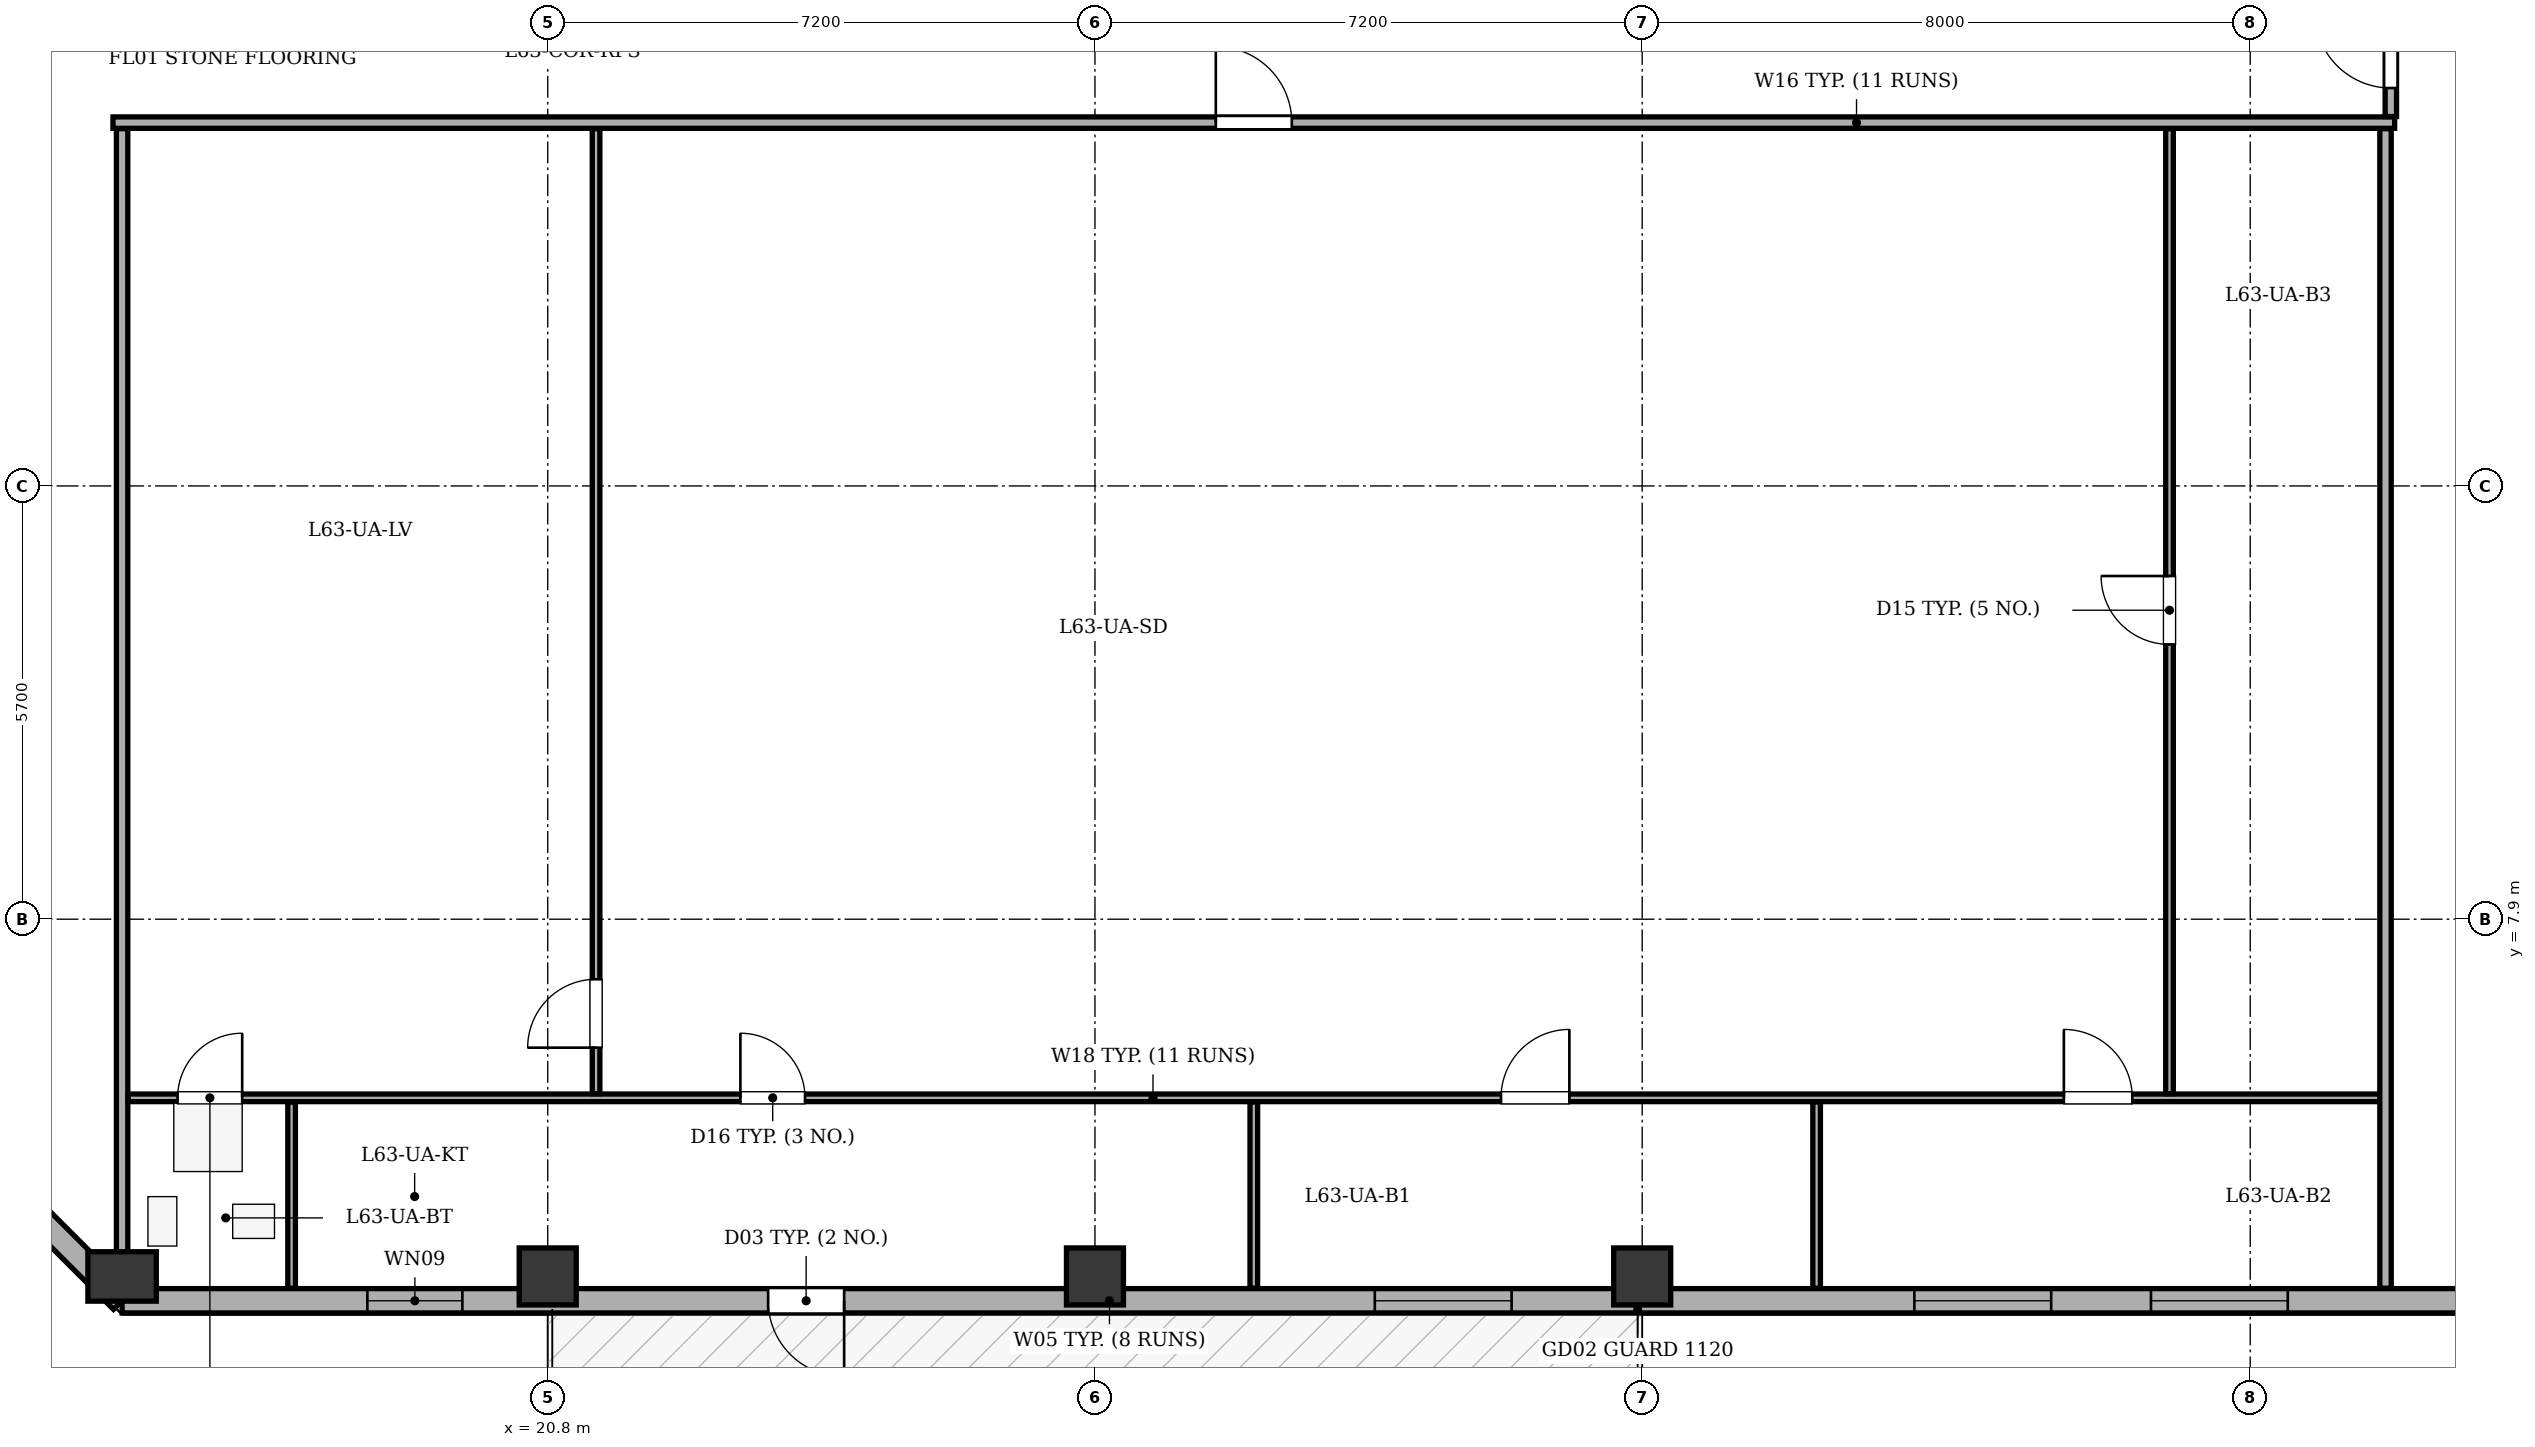
"""IFC4 building model, lengths in metres.
Left out: names, types, materials, properties, quantities, classifications, styles, units other than length and angle.
Written with IfcOpenShell. Run it as: python <this file> out.ifc"""

import sys

from ifc_helpers import new_model, si_unit, direction, frame, frame_2d, origin, origin_2d, place, context, subcontext, project, spatial, rectangle, extrude, element, fill, save


model = new_model("IFC4")
c1 = context("Model", 3, precision=1e-05, world=origin(), true_north=direction((0.0, 1.0)))
c2 = subcontext(c1, "Body", "Model", "MODEL_VIEW")
j1 = project(units=[si_unit("LENGTHUNIT", "METRE"), si_unit("PLANEANGLEUNIT", "RADIAN")], contexts=[c1])
p1 = place(None, origin())
s1 = spatial("IfcSite", under=j1, at=p1, CompositionType="ELEMENT")
p2 = place(p1, origin())
s2 = spatial("IfcBuilding", under=s1, at=p2, CompositionType="ELEMENT")
p3 = place(p2, frame((0.0, 0.0, 241.5)))
s3 = spatial("IfcBuildingStorey", under=s2, at=p3, CompositionType="ELEMENT", Elevation=241.5)
p4 = place(p3, frame((15.2, 3.2, 0.0), z_axis=(0.0, 0.0, 1.0), x_axis=(1.0, 0.0, 0.0)))
e1 = element("IfcColumn", 1, at=p4, inside=s3, PredefinedType="COLUMN", context=c2, shape_type="SweptSolid", body=[
    extrude(rectangle(XDim=0.65, YDim=0.9, at=origin_2d()), origin(), (0.0, 0.0, 1.0), 3.4),
])
for number, where, z_axis, x_axis in (
    (2, (20.8, 3.2, 0.0), (0.0, 0.0, 1.0), (1.0, 0.0, 0.0)),
    (3, (28.0, 3.2, 0.0), (0.0, 0.0, 1.0), (1.0, 0.0, 0.0)),
    (4, (35.2, 3.2, 0.0), (0.0, 0.0, 1.0), (1.0, 0.0, 0.0)),
):
    element("IfcColumn", number, at=place(p3, frame(where, z_axis=z_axis, x_axis=x_axis)), inside=s3, PredefinedType="COLUMN", context=c2, shape_type="SweptSolid", body=[
        extrude(rectangle(XDim=0.75, YDim=0.75, at=origin_2d()), origin(), (0.0, 0.0, 1.0), 3.4),
    ])
p5 = place(p3, frame((51.2, 2.88, 0.0), z_axis=(0.0, 0.0, 1.0), x_axis=(-1.0, 0.0, 0.0)))
e5 = element("IfcWall", 5, at=p5, inside=s3, PredefinedType="STANDARD", context=c2, shape_type="SweptSolid", body=[
    extrude(rectangle(XDim=36.0, YDim=0.32, at=frame_2d((18.0, 0.0))), origin(), (0.0, 0.0, 1.0), 2.725),
])
p6 = place(p5, frame((26.5, 0.0, 0.0)))
e6 = element("IfcOpeningElement", 6, at=p6, cuts=e5, PredefinedType="OPENING", context=c2, shape_type="SweptSolid", body=[
    extrude(rectangle(XDim=1.0, YDim=2.02, at=frame_2d((0.5, 1.01))), frame((0.0, 0.17, 0.0), z_axis=(0.0, -1.0, 0.0), x_axis=(1.0, 0.0, 0.0)), (0.0, 0.0, 1.0), 0.34),
])
p7 = place(p5, frame((2.31, 0.0, 0.75)))
e7 = element("IfcOpeningElement", 7, at=p7, cuts=e5, PredefinedType="OPENING", context=c2, shape_type="SweptSolid", body=[
    extrude(rectangle(XDim=1.8, YDim=1.7, at=frame_2d((0.9, 0.85))), frame((0.0, 0.17, 0.0), z_axis=(0.0, -1.0, 0.0), x_axis=(1.0, 0.0, 0.0)), (0.0, 0.0, 1.0), 0.34),
])
p8 = place(p5, frame((7.506, 0.0, 0.75)))
e8 = element("IfcOpeningElement", 8, at=p8, cuts=e5, PredefinedType="OPENING", context=c2, shape_type="SweptSolid", body=[
    extrude(rectangle(XDim=1.8, YDim=1.7, at=frame_2d((0.9, 0.85))), frame((0.0, 0.17, 0.0), z_axis=(0.0, -1.0, 0.0), x_axis=(1.0, 0.0, 0.0)), (0.0, 0.0, 1.0), 0.34),
])
p9 = place(p5, frame((10.619, 0.0, 0.75)))
e9 = element("IfcOpeningElement", 9, at=p9, cuts=e5, PredefinedType="OPENING", context=c2, shape_type="SweptSolid", body=[
    extrude(rectangle(XDim=1.8, YDim=1.7, at=frame_2d((0.9, 0.85))), frame((0.0, 0.17, 0.0), z_axis=(0.0, -1.0, 0.0), x_axis=(1.0, 0.0, 0.0)), (0.0, 0.0, 1.0), 0.34),
])
p10 = place(p5, frame((17.718, 0.0, 0.75)))
e10 = element("IfcOpeningElement", 10, at=p10, cuts=e5, PredefinedType="OPENING", context=c2, shape_type="SweptSolid", body=[
    extrude(rectangle(XDim=1.8, YDim=1.7, at=frame_2d((0.9, 0.85))), frame((0.0, 0.17, 0.0), z_axis=(0.0, -1.0, 0.0), x_axis=(1.0, 0.0, 0.0)), (0.0, 0.0, 1.0), 0.34),
])
p11 = place(p5, frame((31.523, 0.0, 0.75)))
e11 = element("IfcOpeningElement", 11, at=p11, cuts=e5, PredefinedType="OPENING", context=c2, shape_type="SweptSolid", body=[
    extrude(rectangle(XDim=1.25, YDim=1.7, at=frame_2d((0.625, 0.85))), frame((0.0, 0.17, 0.0), z_axis=(0.0, -1.0, 0.0), x_axis=(1.0, 0.0, 0.0)), (0.0, 0.0, 1.0), 0.34),
])
p12 = place(p3, frame((15.2, 2.88, 0.0), z_axis=(0.0, 0.0, 1.0), x_axis=(-0.707106781187, 0.707106781187, 0.0)))
e12 = element("IfcWall", 12, at=p12, inside=s3, PredefinedType="STANDARD", context=c2, shape_type="SweptSolid", body=[
    extrude(rectangle(XDim=6.11, YDim=0.32, at=frame_2d((3.055, 0.0))), origin(), (0.0, 0.0, 1.0), 2.725),
])
p13 = place(p12, frame((2.355, 0.0, 0.75)))
e13 = element("IfcOpeningElement", 13, at=p13, cuts=e12, PredefinedType="OPENING", context=c2, shape_type="SweptSolid", body=[
    extrude(rectangle(XDim=1.4, YDim=1.65, at=frame_2d((0.7, 0.825))), frame((0.0, 0.17, 0.0), z_axis=(0.0, -1.0, 0.0), x_axis=(1.0, 0.0, 0.0)), (0.0, 0.0, 1.0), 0.34),
])
p14 = place(p3, frame((15.08, 18.38, 0.0), z_axis=(0.0, 0.0, 1.0), x_axis=(1.0, 0.0, 0.0)))
e14 = element("IfcWall", 14, at=p14, inside=s3, PredefinedType="PARTITIONING", context=c2, shape_type="SweptSolid", body=[
    extrude(rectangle(XDim=30.02, YDim=0.15, at=frame_2d((15.01, 0.0))), origin(), (0.0, 0.0, 1.0), 3.1),
])
p15 = place(p14, frame((14.51, 0.0, 0.0)))
e15 = element("IfcOpeningElement", 15, at=p15, cuts=e14, PredefinedType="OPENING", context=c2, shape_type="SweptSolid", body=[
    extrude(rectangle(XDim=1.0, YDim=2.1, at=frame_2d((0.5, 1.05))), frame((0.0, 0.085, 0.0), z_axis=(0.0, -1.0, 0.0), x_axis=(1.0, 0.0, 0.0)), (0.0, 0.0, 1.0), 0.17),
])
p16 = place(p3, frame((15.2, 3.045, 0.0), z_axis=(0.0, 0.0, 1.0), x_axis=(0.0, 1.0, 0.0)))
e16 = element("IfcWall", 16, at=p16, inside=s3, PredefinedType="PARTITIONING", context=c2, shape_type="SweptSolid", body=[
    extrude(rectangle(XDim=15.255, YDim=0.15, at=frame_2d((7.627, 0.0))), origin(), (0.0, 0.0, 1.0), 3.1),
])
p17 = place(p3, frame((15.28, 5.55, 0.0), z_axis=(0.0, 0.0, 1.0), x_axis=(1.0, 0.0, 0.0)))
e17 = element("IfcWall", 17, at=p17, inside=s3, PredefinedType="PARTITIONING", context=c2, shape_type="SweptSolid", body=[
    extrude(rectangle(XDim=29.74, YDim=0.1, at=frame_2d((14.87, 0.0))), origin(), (0.0, 0.0, 1.0), 3.1),
])
p18 = place(p17, frame((0.65, 0.0, 0.0)))
e18 = element("IfcOpeningElement", 18, at=p18, cuts=e17, PredefinedType="OPENING", context=c2, shape_type="SweptSolid", body=[
    extrude(rectangle(XDim=0.85, YDim=2.05, at=frame_2d((0.425, 1.025))), frame((0.0, 0.06, 0.0), z_axis=(0.0, -1.0, 0.0), x_axis=(1.0, 0.0, 0.0)), (0.0, 0.0, 1.0), 0.12),
])
p19 = place(p17, frame((8.055, 0.0, 0.0)))
e19 = element("IfcOpeningElement", 19, at=p19, cuts=e17, PredefinedType="OPENING", context=c2, shape_type="SweptSolid", body=[
    extrude(rectangle(XDim=0.85, YDim=2.05, at=frame_2d((0.425, 1.025))), frame((0.0, 0.06, 0.0), z_axis=(0.0, -1.0, 0.0), x_axis=(1.0, 0.0, 0.0)), (0.0, 0.0, 1.0), 0.12),
])
p20 = place(p17, frame((18.062, 0.0, 0.0)))
e20 = element("IfcOpeningElement", 20, at=p20, cuts=e17, PredefinedType="OPENING", context=c2, shape_type="SweptSolid", body=[
    extrude(rectangle(XDim=0.9, YDim=2.05, at=frame_2d((0.45, 1.025))), frame((0.0, 0.06, 0.0), z_axis=(0.0, -1.0, 0.0), x_axis=(1.0, 0.0, 0.0)), (0.0, 0.0, 1.0), 0.12),
])
p21 = place(p17, frame((25.468, 0.0, 0.0)))
e21 = element("IfcOpeningElement", 21, at=p21, cuts=e17, PredefinedType="OPENING", context=c2, shape_type="SweptSolid", body=[
    extrude(rectangle(XDim=0.9, YDim=2.05, at=frame_2d((0.45, 1.025))), frame((0.0, 0.06, 0.0), z_axis=(0.0, -1.0, 0.0), x_axis=(1.0, 0.0, 0.0)), (0.0, 0.0, 1.0), 0.12),
])
p22 = place(p3, frame((42.138, 5.605, 0.0), z_axis=(0.0, 0.0, 1.0), x_axis=(0.0, 1.0, 0.0)))
e22 = element("IfcWall", 22, at=p22, inside=s3, PredefinedType="PARTITIONING", context=c2, shape_type="SweptSolid", body=[
    extrude(rectangle(XDim=12.695, YDim=0.1, at=frame_2d((6.348, 0.0))), origin(), (0.0, 0.0, 1.0), 2.725),
])
p23 = place(p22, frame((5.91, 0.0, 0.0)))
e23 = element("IfcOpeningElement", 23, at=p23, cuts=e22, PredefinedType="OPENING", context=c2, shape_type="SweptSolid", body=[
    extrude(rectangle(XDim=0.9, YDim=2.05, at=frame_2d((0.45, 1.025))), frame((0.0, 0.06, 0.0), z_axis=(0.0, -1.0, 0.0), x_axis=(1.0, 0.0, 0.0)), (0.0, 0.0, 1.0), 0.12),
])
p24 = place(p3, frame((21.436, 5.605, 0.0), z_axis=(0.0, 0.0, 1.0), x_axis=(0.0, 1.0, 0.0)))
e24 = element("IfcWall", 24, at=p24, inside=s3, PredefinedType="PARTITIONING", context=c2, shape_type="SweptSolid", body=[
    extrude(rectangle(XDim=12.695, YDim=0.1, at=frame_2d((6.348, 0.0))), origin(), (0.0, 0.0, 1.0), 3.1),
])
p25 = place(p24, frame((0.605, 0.0, 0.0)))
e25 = element("IfcOpeningElement", 25, at=p25, cuts=e24, PredefinedType="OPENING", context=c2, shape_type="SweptSolid", body=[
    extrude(rectangle(XDim=0.9, YDim=2.05, at=frame_2d((0.45, 1.025))), frame((0.0, 0.06, 0.0), z_axis=(0.0, -1.0, 0.0), x_axis=(1.0, 0.0, 0.0)), (0.0, 0.0, 1.0), 0.12),
])
for number, where, z_axis, x_axis in (
    (26, (17.43, 3.045, 0.0), (0.0, 0.0, 1.0), (0.0, 1.0, 0.0)),
    (27, (30.09, 3.045, 0.0), (0.0, 0.0, 1.0), (0.0, 1.0, 0.0)),
    (28, (37.495, 3.045, 0.0), (0.0, 0.0, 1.0), (0.0, 1.0, 0.0)),
):
    element("IfcWall", number, at=place(p3, frame(where, z_axis=z_axis, x_axis=x_axis)), inside=s3, PredefinedType="PARTITIONING", context=c2, shape_type="SweptSolid", body=[
        extrude(rectangle(XDim=2.45, YDim=0.1, at=frame_2d((1.225, 0.0))), origin(), (0.0, 0.0, 1.0), 3.1),
    ])
p26 = place(p3, frame((44.98, 3.045, 0.0), z_axis=(0.0, 0.0, 1.0), x_axis=(0.0, 1.0, 0.0)))
e29 = element("IfcWall", 29, at=p26, inside=s3, PredefinedType="PARTITIONING", context=c2, shape_type="SweptSolid", body=[
    extrude(rectangle(XDim=15.255, YDim=0.15, at=frame_2d((7.627, 0.0))), origin(), (0.0, 0.0, 1.0), 2.725),
])
p27 = place(p3, frame((45.05, 18.46, 0.0), z_axis=(0.0, 0.0, 1.0), x_axis=(0.0, 1.0, 0.0)))
e30 = element("IfcWall", 30, at=p27, inside=s3, PredefinedType="PARTITIONING", context=c2, shape_type="SweptSolid", body=[
    extrude(rectangle(XDim=1.79, YDim=0.15, at=frame_2d((0.895, 0.0))), origin(), (0.0, 0.0, 1.0), 2.725),
])
p28 = place(p27, frame((0.375, 0.0, 0.0)))
e31 = element("IfcOpeningElement", 31, at=p28, cuts=e30, PredefinedType="OPENING", context=c2, shape_type="SweptSolid", body=[
    extrude(rectangle(XDim=1.0, YDim=2.1, at=frame_2d((0.5, 1.05))), frame((0.0, 0.085, 0.0), z_axis=(0.0, -1.0, 0.0), x_axis=(1.0, 0.0, 0.0)), (0.0, 0.0, 1.0), 0.17),
])
p29 = place(p6, origin())
e32 = element("IfcDoor", 32, at=p29, inside=s3, OperationType="SINGLE_SWING_LEFT", PredefinedType="DOOR", context=c2, shape_type="SweptSolid", body=[
    extrude(rectangle(XDim=1.0, YDim=2.02, at=frame_2d((0.5, 1.01))), frame((0.0, 0.025, 0.0), z_axis=(0.0, -1.0, 0.0), x_axis=(1.0, 0.0, 0.0)), (0.0, 0.0, 1.0), 0.05),
])
fill(e6, e32)
p30 = place(p8, origin())
e33 = element("IfcWindow", 33, at=p30, inside=s3, PartitioningType="SINGLE_PANEL", PredefinedType="WINDOW", context=c2, shape_type="SweptSolid", body=[
    extrude(rectangle(XDim=1.8, YDim=1.7, at=frame_2d((0.9, 0.85))), frame((0.0, -0.01, 0.0), z_axis=(0.0, -1.0, 0.0), x_axis=(1.0, 0.0, 0.0)), (0.0, 0.0, 1.0), 0.06),
])
fill(e8, e33)
p31 = place(p9, origin())
e34 = element("IfcWindow", 34, at=p31, inside=s3, PartitioningType="SINGLE_PANEL", PredefinedType="WINDOW", context=c2, shape_type="SweptSolid", body=[
    extrude(rectangle(XDim=1.8, YDim=1.7, at=frame_2d((0.9, 0.85))), frame((0.0, -0.01, 0.0), z_axis=(0.0, -1.0, 0.0), x_axis=(1.0, 0.0, 0.0)), (0.0, 0.0, 1.0), 0.06),
])
fill(e9, e34)
p32 = place(p10, origin())
e35 = element("IfcWindow", 35, at=p32, inside=s3, PartitioningType="SINGLE_PANEL", PredefinedType="WINDOW", context=c2, shape_type="SweptSolid", body=[
    extrude(rectangle(XDim=1.8, YDim=1.7, at=frame_2d((0.9, 0.85))), frame((0.0, -0.01, 0.0), z_axis=(0.0, -1.0, 0.0), x_axis=(1.0, 0.0, 0.0)), (0.0, 0.0, 1.0), 0.06),
])
fill(e10, e35)
p33 = place(p11, origin())
e36 = element("IfcWindow", 36, at=p33, inside=s3, PartitioningType="SINGLE_PANEL", PredefinedType="WINDOW", context=c2, shape_type="SweptSolid", body=[
    extrude(rectangle(XDim=1.25, YDim=1.7, at=frame_2d((0.625, 0.85))), frame((0.0, -0.01, 0.0), z_axis=(0.0, -1.0, 0.0), x_axis=(1.0, 0.0, 0.0)), (0.0, 0.0, 1.0), 0.06),
])
fill(e11, e36)
p34 = place(p15, origin())
e37 = element("IfcDoor", 37, at=p34, inside=s3, OperationType="SINGLE_SWING_LEFT", PredefinedType="DOOR", context=c2, shape_type="SweptSolid", body=[
    extrude(rectangle(XDim=1.0, YDim=2.1, at=frame_2d((0.5, 1.05))), frame((0.0, 0.025, 0.0), z_axis=(0.0, -1.0, 0.0), x_axis=(1.0, 0.0, 0.0)), (0.0, 0.0, 1.0), 0.05),
])
fill(e15, e37)
p35 = place(p23, origin())
e38 = element("IfcDoor", 38, at=p35, inside=s3, OperationType="SINGLE_SWING_RIGHT", PredefinedType="DOOR", context=c2, shape_type="SweptSolid", body=[
    extrude(rectangle(XDim=0.9, YDim=2.05, at=frame_2d((0.45, 1.025))), frame((0.0, 0.025, 0.0), z_axis=(0.0, -1.0, 0.0), x_axis=(1.0, 0.0, 0.0)), (0.0, 0.0, 1.0), 0.05),
])
fill(e23, e38)
p36 = place(p25, origin())
e39 = element("IfcDoor", 39, at=p36, inside=s3, OperationType="SINGLE_SWING_LEFT", PredefinedType="DOOR", context=c2, shape_type="SweptSolid", body=[
    extrude(rectangle(XDim=0.9, YDim=2.05, at=frame_2d((0.45, 1.025))), frame((0.0, 0.025, 0.0), z_axis=(0.0, -1.0, 0.0), x_axis=(1.0, 0.0, 0.0)), (0.0, 0.0, 1.0), 0.05),
])
fill(e25, e39)
p37 = place(p18, origin())
e40 = element("IfcDoor", 40, at=p37, inside=s3, OperationType="SINGLE_SWING_RIGHT", PredefinedType="DOOR", context=c2, shape_type="SweptSolid", body=[
    extrude(rectangle(XDim=0.85, YDim=2.05, at=frame_2d((0.425, 1.025))), frame((0.0, 0.025, 0.0), z_axis=(0.0, -1.0, 0.0), x_axis=(1.0, 0.0, 0.0)), (0.0, 0.0, 1.0), 0.05),
])
fill(e18, e40)
p38 = place(p19, origin())
e41 = element("IfcDoor", 41, at=p38, inside=s3, OperationType="SINGLE_SWING_LEFT", PredefinedType="DOOR", context=c2, shape_type="SweptSolid", body=[
    extrude(rectangle(XDim=0.85, YDim=2.05, at=frame_2d((0.425, 1.025))), frame((0.0, 0.025, 0.0), z_axis=(0.0, -1.0, 0.0), x_axis=(1.0, 0.0, 0.0)), (0.0, 0.0, 1.0), 0.05),
])
fill(e19, e41)
p39 = place(p20, origin())
e42 = element("IfcDoor", 42, at=p39, inside=s3, OperationType="SINGLE_SWING_RIGHT", PredefinedType="DOOR", context=c2, shape_type="SweptSolid", body=[
    extrude(rectangle(XDim=0.9, YDim=2.05, at=frame_2d((0.45, 1.025))), frame((0.0, 0.025, 0.0), z_axis=(0.0, -1.0, 0.0), x_axis=(1.0, 0.0, 0.0)), (0.0, 0.0, 1.0), 0.05),
])
fill(e20, e42)
p40 = place(p21, origin())
e43 = element("IfcDoor", 43, at=p40, inside=s3, OperationType="SINGLE_SWING_LEFT", PredefinedType="DOOR", context=c2, shape_type="SweptSolid", body=[
    extrude(rectangle(XDim=0.9, YDim=2.05, at=frame_2d((0.45, 1.025))), frame((0.0, 0.025, 0.0), z_axis=(0.0, -1.0, 0.0), x_axis=(1.0, 0.0, 0.0)), (0.0, 0.0, 1.0), 0.05),
])
fill(e21, e43)
p41 = place(p28, origin())
e44 = element("IfcDoor", 44, at=p41, inside=s3, OperationType="SINGLE_SWING_RIGHT", PredefinedType="DOOR", context=c2, shape_type="SweptSolid", body=[
    extrude(rectangle(XDim=1.0, YDim=2.1, at=frame_2d((0.5, 1.05))), frame((0.0, 0.025, 0.0), z_axis=(0.0, -1.0, 0.0), x_axis=(1.0, 0.0, 0.0)), (0.0, 0.0, 1.0), 0.05),
])
fill(e31, e44)
save(model, sys.argv[1])
